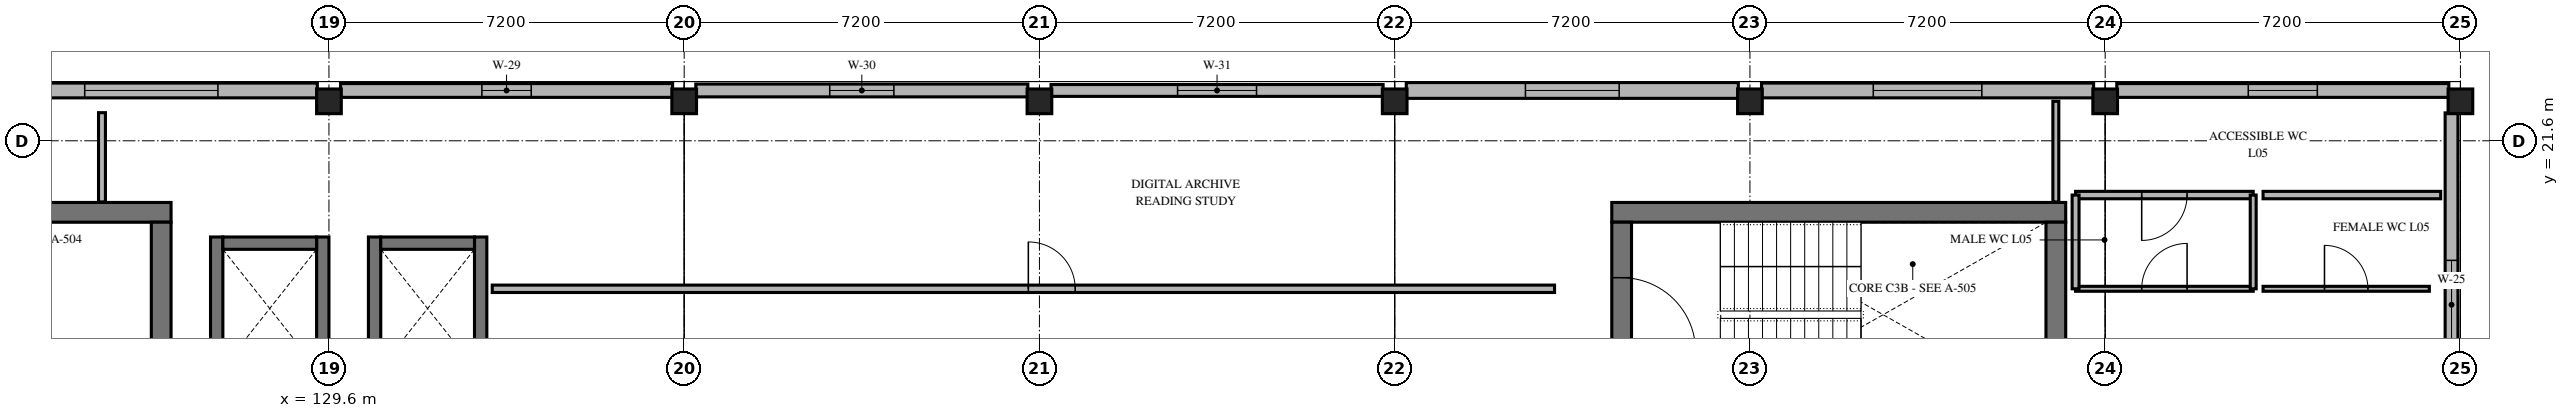
"""IFC4 building model, lengths in metres.
Left out: names, types, materials, properties, quantities, classifications, styles, units other than length and angle.
Written with IfcOpenShell. Run it as: python <this file> out.ifc"""

import sys

from ifc_helpers import new_model, si_unit, direction, frame, frame_2d, origin, origin_2d, place, context, subcontext, project, spatial, rectangle, extrude, element, fill, save


model = new_model("IFC4")
c1 = context("Model", 3, precision=1e-05, world=origin(), true_north=direction((0.0, 1.0)))
c2 = subcontext(c1, "Body", "Model", "MODEL_VIEW")
j1 = project(units=[si_unit("LENGTHUNIT", "METRE"), si_unit("PLANEANGLEUNIT", "RADIAN")], contexts=[c1])
p1 = place(None, origin())
s1 = spatial("IfcSite", under=j1, at=p1, CompositionType="ELEMENT")
p2 = place(p1, origin())
s2 = spatial("IfcBuilding", under=s1, at=p2, CompositionType="ELEMENT")
p3 = place(p2, frame((0.0, 0.0, 20.7)))
s3 = spatial("IfcBuildingStorey", under=s2, at=p3, CompositionType="ELEMENT", Elevation=20.7)
for number, where, z_axis, x_axis in (
    (1, (129.6, 22.4, 0.0), (0.0, 0.0, 1.0), (1.0, 0.0, 0.0)),
    (2, (136.8, 22.4, 0.0), (0.0, 0.0, 1.0), (1.0, 0.0, 0.0)),
    (3, (144.0, 22.4, 0.0), (0.0, 0.0, 1.0), (1.0, 0.0, 0.0)),
    (4, (151.2, 22.4, 0.0), (0.0, 0.0, 1.0), (1.0, 0.0, 0.0)),
    (5, (158.4, 22.4, 0.0), (0.0, 0.0, 1.0), (1.0, 0.0, 0.0)),
    (6, (165.6, 22.4, 0.0), (0.0, 0.0, 1.0), (1.0, 0.0, 0.0)),
    (7, (172.8, 22.4, 0.0), (0.0, 0.0, 1.0), (1.0, 0.0, 0.0)),
):
    element("IfcColumn", number, at=place(p3, frame(where, z_axis=z_axis, x_axis=x_axis)), inside=s3, PredefinedType="COLUMN", context=c2, shape_type="SweptSolid", body=[
        extrude(rectangle(XDim=0.5, YDim=0.5, at=origin_2d()), origin(), (0.0, 0.0, 1.0), 3.9),
    ])
p4 = place(p3, frame((172.62, 22.165, 0.0), z_axis=(0.0, 0.0, 1.0), x_axis=(0.0, -1.0, 0.0)))
e8 = element("IfcWall", 8, at=p4, inside=s3, PredefinedType="SOLIDWALL", context=c2, shape_type="SweptSolid", body=[
    extrude(rectangle(XDim=7.777, YDim=0.26, at=frame_2d((3.889, 0.0))), origin(), (0.0, 0.0, 1.0), 2.9),
])
p5 = place(p4, frame((2.989, 0.0, 0.9)))
e9 = element("IfcOpeningElement", 9, at=p5, cuts=e8, PredefinedType="OPENING", context=c2, shape_type="SweptSolid", body=[
    extrude(rectangle(XDim=1.8, YDim=0.75, at=frame_2d((0.9, 0.375))), frame((0.0, 0.14, 0.0), z_axis=(0.0, -1.0, 0.0), x_axis=(1.0, 0.0, 0.0)), (0.0, 0.0, 1.0), 0.28),
])
p6 = place(p3, frame((122.635, 22.62, 0.0), z_axis=(0.0, 0.0, 1.0), x_axis=(1.0, 0.0, 0.0)))
e10 = element("IfcWall", 10, at=p6, inside=s3, PredefinedType="SOLIDWALL", context=c2, shape_type="SweptSolid", body=[
    extrude(rectangle(XDim=6.73, YDim=0.3, at=frame_2d((3.365, 0.0))), origin(), (0.0, 0.0, 1.0), 3.01),
])
p7 = place(p6, frame((2.015, 0.0, 0.9)))
e11 = element("IfcOpeningElement", 11, at=p7, cuts=e10, PredefinedType="OPENING", context=c2, shape_type="SweptSolid", body=[
    extrude(rectangle(XDim=2.7, YDim=0.75, at=frame_2d((1.35, 0.375))), frame((0.0, 0.16, 0.0), z_axis=(0.0, -1.0, 0.0), x_axis=(1.0, 0.0, 0.0)), (0.0, 0.0, 1.0), 0.32),
])
p8 = place(p3, frame((129.835, 22.62, 0.0), z_axis=(0.0, 0.0, 1.0), x_axis=(1.0, 0.0, 0.0)))
e12 = element("IfcWall", 12, at=p8, inside=s3, PredefinedType="SOLIDWALL", context=c2, shape_type="SweptSolid", body=[
    extrude(rectangle(XDim=6.73, YDim=0.28, at=frame_2d((3.365, 0.0))), origin(), (0.0, 0.0, 1.0), 3.06),
])
p9 = place(p8, frame((2.865, 0.0, 0.75)))
e13 = element("IfcOpeningElement", 13, at=p9, cuts=e12, PredefinedType="OPENING", context=c2, shape_type="SweptSolid", body=[
    extrude(rectangle(XDim=1.0, YDim=1.45, at=frame_2d((0.5, 0.725))), frame((0.0, 0.15, 0.0), z_axis=(0.0, -1.0, 0.0), x_axis=(1.0, 0.0, 0.0)), (0.0, 0.0, 1.0), 0.3),
])
p10 = place(p3, frame((137.035, 22.62, 0.0), z_axis=(0.0, 0.0, 1.0), x_axis=(1.0, 0.0, 0.0)))
e14 = element("IfcWall", 14, at=p10, inside=s3, PredefinedType="SOLIDWALL", context=c2, shape_type="SweptSolid", body=[
    extrude(rectangle(XDim=6.73, YDim=0.26, at=frame_2d((3.365, 0.0))), origin(), (0.0, 0.0, 1.0), 2.86),
])
p11 = place(p10, frame((2.715, 0.0, 0.75)))
e15 = element("IfcOpeningElement", 15, at=p11, cuts=e14, PredefinedType="OPENING", context=c2, shape_type="SweptSolid", body=[
    extrude(rectangle(XDim=1.3, YDim=1.45, at=frame_2d((0.65, 0.725))), frame((0.0, 0.14, 0.0), z_axis=(0.0, -1.0, 0.0), x_axis=(1.0, 0.0, 0.0)), (0.0, 0.0, 1.0), 0.28),
])
p12 = place(p3, frame((144.235, 22.62, 0.0), z_axis=(0.0, 0.0, 1.0), x_axis=(1.0, 0.0, 0.0)))
e16 = element("IfcWall", 16, at=p12, inside=s3, PredefinedType="SOLIDWALL", context=c2, shape_type="SweptSolid", body=[
    extrude(rectangle(XDim=6.73, YDim=0.24, at=frame_2d((3.365, 0.0))), origin(), (0.0, 0.0, 1.0), 2.91),
])
p13 = place(p12, frame((2.565, 0.0, 0.75)))
e17 = element("IfcOpeningElement", 17, at=p13, cuts=e16, PredefinedType="OPENING", context=c2, shape_type="SweptSolid", body=[
    extrude(rectangle(XDim=1.6, YDim=1.45, at=frame_2d((0.8, 0.725))), frame((0.0, 0.13, 0.0), z_axis=(0.0, -1.0, 0.0), x_axis=(1.0, 0.0, 0.0)), (0.0, 0.0, 1.0), 0.26),
])
p14 = place(p3, frame((151.435, 22.62, 0.0), z_axis=(0.0, 0.0, 1.0), x_axis=(1.0, 0.0, 0.0)))
e18 = element("IfcWall", 18, at=p14, inside=s3, PredefinedType="SOLIDWALL", context=c2, shape_type="SweptSolid", body=[
    extrude(rectangle(XDim=6.73, YDim=0.32, at=frame_2d((3.365, 0.0))), origin(), (0.0, 0.0, 1.0), 2.96),
])
p15 = place(p14, frame((2.415, 0.0, 0.75)))
e19 = element("IfcOpeningElement", 19, at=p15, cuts=e18, PredefinedType="OPENING", context=c2, shape_type="SweptSolid", body=[
    extrude(rectangle(XDim=1.9, YDim=1.45, at=frame_2d((0.95, 0.725))), frame((0.0, 0.17, 0.0), z_axis=(0.0, -1.0, 0.0), x_axis=(1.0, 0.0, 0.0)), (0.0, 0.0, 1.0), 0.34),
])
p16 = place(p3, frame((158.635, 22.62, 0.0), z_axis=(0.0, 0.0, 1.0), x_axis=(1.0, 0.0, 0.0)))
e20 = element("IfcWall", 20, at=p16, inside=s3, PredefinedType="SOLIDWALL", context=c2, shape_type="SweptSolid", body=[
    extrude(rectangle(XDim=6.73, YDim=0.3, at=frame_2d((3.365, 0.0))), origin(), (0.0, 0.0, 1.0), 3.01),
])
p17 = place(p16, frame((2.265, 0.0, 0.75)))
e21 = element("IfcOpeningElement", 21, at=p17, cuts=e20, PredefinedType="OPENING", context=c2, shape_type="SweptSolid", body=[
    extrude(rectangle(XDim=2.2, YDim=1.45, at=frame_2d((1.1, 0.725))), frame((0.0, 0.16, 0.0), z_axis=(0.0, -1.0, 0.0), x_axis=(1.0, 0.0, 0.0)), (0.0, 0.0, 1.0), 0.32),
])
p18 = place(p3, frame((165.835, 22.62, 0.0), z_axis=(0.0, 0.0, 1.0), x_axis=(1.0, 0.0, 0.0)))
e22 = element("IfcWall", 22, at=p18, inside=s3, PredefinedType="SOLIDWALL", context=c2, shape_type="SweptSolid", body=[
    extrude(rectangle(XDim=6.73, YDim=0.28, at=frame_2d((3.365, 0.0))), origin(), (0.0, 0.0, 1.0), 3.06),
])
p19 = place(p18, frame((2.665, 0.0, 0.9)))
e23 = element("IfcOpeningElement", 23, at=p19, cuts=e22, PredefinedType="OPENING", context=c2, shape_type="SweptSolid", body=[
    extrude(rectangle(XDim=1.4, YDim=0.85, at=frame_2d((0.7, 0.425))), frame((0.0, 0.15, 0.0), z_axis=(0.0, -1.0, 0.0), x_axis=(1.0, 0.0, 0.0)), (0.0, 0.0, 1.0), 0.3),
])
p20 = place(p3, frame((126.4, 20.15, 0.0), z_axis=(0.0, 0.0, 1.0), x_axis=(-1.0, 0.0, 0.0)))
e24 = element("IfcWall", 24, at=p20, inside=s3, PredefinedType="SHEAR", context=c2, shape_type="SweptSolid", body=[
    extrude(rectangle(XDim=9.2, YDim=0.4, at=frame_2d((4.6, 0.0))), origin(), (0.0, 0.0, 1.0), 3.9),
])
p21 = place(p3, frame((126.2, 16.2, 0.0), z_axis=(0.0, 0.0, 1.0), x_axis=(0.0, 1.0, 0.0)))
e25 = element("IfcWall", 25, at=p21, inside=s3, PredefinedType="SHEAR", context=c2, shape_type="SweptSolid", body=[
    extrude(rectangle(XDim=3.75, YDim=0.4, at=frame_2d((1.875, 0.0))), origin(), (0.0, 0.0, 1.0), 3.9),
])
p22 = place(p3, frame((164.8, 20.15, 0.0), z_axis=(0.0, 0.0, 1.0), x_axis=(-1.0, 0.0, 0.0)))
e26 = element("IfcWall", 26, at=p22, inside=s3, PredefinedType="SHEAR", context=c2, shape_type="SweptSolid", body=[
    extrude(rectangle(XDim=9.2, YDim=0.4, at=frame_2d((4.6, 0.0))), origin(), (0.0, 0.0, 1.0), 3.9),
])
p23 = place(p3, frame((164.6, 16.2, 0.0), z_axis=(0.0, 0.0, 1.0), x_axis=(0.0, 1.0, 0.0)))
e27 = element("IfcWall", 27, at=p23, inside=s3, PredefinedType="SHEAR", context=c2, shape_type="SweptSolid", body=[
    extrude(rectangle(XDim=3.75, YDim=0.4, at=frame_2d((1.875, 0.0))), origin(), (0.0, 0.0, 1.0), 3.9),
])
p24 = place(p3, frame((155.8, 19.95, 0.0), z_axis=(0.0, 0.0, 1.0), x_axis=(0.0, -1.0, 0.0)))
e28 = element("IfcWall", 28, at=p24, inside=s3, PredefinedType="SHEAR", context=c2, shape_type="SweptSolid", body=[
    extrude(rectangle(XDim=3.75, YDim=0.4, at=frame_2d((1.875, 0.0))), origin(), (0.0, 0.0, 1.0), 3.9),
])
p25 = place(p24, frame((1.125, 0.0, 0.0)))
e29 = element("IfcOpeningElement", 29, at=p25, cuts=e28, PredefinedType="OPENING", context=c2, shape_type="SweptSolid", body=[
    extrude(rectangle(XDim=1.5, YDim=2.2, at=frame_2d((0.75, 1.1))), frame((0.0, 0.21, 0.0), z_axis=(0.0, -1.0, 0.0), x_axis=(1.0, 0.0, 0.0)), (0.0, 0.0, 1.0), 0.42),
])
for number, where, z_axis, x_axis in (
    (30, (127.325, 16.75, 0.0), (0.0, 0.0, 1.0), (0.0, 1.0, 0.0)),
    (31, (129.475, 19.65, 0.0), (0.0, 0.0, 1.0), (0.0, -1.0, 0.0)),
):
    element("IfcWall", number, at=place(p3, frame(where, z_axis=z_axis, x_axis=x_axis)), inside=s3, PredefinedType="SOLIDWALL", context=c2, shape_type="SweptSolid", body=[
        extrude(rectangle(XDim=2.9, YDim=0.25, at=frame_2d((1.45, 0.0))), origin(), (0.0, 0.0, 1.0), 3.66),
    ])
p26 = place(p3, frame((129.35, 19.525, 0.0), z_axis=(0.0, 0.0, 1.0), x_axis=(-1.0, 0.0, 0.0)))
e32 = element("IfcWall", 32, at=p26, inside=s3, PredefinedType="SOLIDWALL", context=c2, shape_type="SweptSolid", body=[
    extrude(rectangle(XDim=1.9, YDim=0.25, at=frame_2d((0.95, 0.0))), origin(), (0.0, 0.0, 1.0), 3.66),
])
for number, where, z_axis, x_axis in (
    (33, (130.525, 16.75, 0.0), (0.0, 0.0, 1.0), (0.0, 1.0, 0.0)),
    (34, (132.675, 19.65, 0.0), (0.0, 0.0, 1.0), (0.0, -1.0, 0.0)),
):
    element("IfcWall", number, at=place(p3, frame(where, z_axis=z_axis, x_axis=x_axis)), inside=s3, PredefinedType="SOLIDWALL", context=c2, shape_type="SweptSolid", body=[
        extrude(rectangle(XDim=2.9, YDim=0.25, at=frame_2d((1.45, 0.0))), origin(), (0.0, 0.0, 1.0), 3.66),
    ])
p27 = place(p3, frame((132.55, 19.525, 0.0), z_axis=(0.0, 0.0, 1.0), x_axis=(-1.0, 0.0, 0.0)))
e35 = element("IfcWall", 35, at=p27, inside=s3, PredefinedType="SOLIDWALL", context=c2, shape_type="SweptSolid", body=[
    extrude(rectangle(XDim=1.9, YDim=0.25, at=frame_2d((0.95, 0.0))), origin(), (0.0, 0.0, 1.0), 3.66),
])
p28 = place(p3, frame((132.91, 18.6, 0.0), z_axis=(0.0, 0.0, 1.0), x_axis=(1.0, 0.0, 0.0)))
e36 = element("IfcWall", 36, at=p28, inside=s3, PredefinedType="PARTITIONING", context=c2, shape_type="SweptSolid", body=[
    extrude(rectangle(XDim=21.53, YDim=0.15, at=frame_2d((10.765, 0.0))), origin(), (0.0, 0.0, 1.0), 2.86),
])
p29 = place(p28, frame((10.865, 0.0, 0.0)))
e37 = element("IfcOpeningElement", 37, at=p29, cuts=e36, PredefinedType="OPENING", context=c2, shape_type="SweptSolid", body=[
    extrude(rectangle(XDim=0.95, YDim=2.15, at=frame_2d((0.475, 1.075))), frame((0.0, 0.085, 0.0), z_axis=(0.0, -1.0, 0.0), x_axis=(1.0, 0.0, 0.0)), (0.0, 0.0, 1.0), 0.17),
])
p30 = place(p3, frame((125.0, 22.17, 0.0), z_axis=(0.0, 0.0, 1.0), x_axis=(0.0, -1.0, 0.0)))
e38 = element("IfcWall", 38, at=p30, inside=s3, PredefinedType="PARTITIONING", context=c2, shape_type="SweptSolid", body=[
    extrude(rectangle(XDim=1.81, YDim=0.14, at=frame_2d((0.905, 0.0))), origin(), (0.0, 0.0, 1.0), 3.66),
])
p31 = place(p3, frame((164.6, 20.36, 0.0), z_axis=(0.0, 0.0, 1.0), x_axis=(0.0, 1.0, 0.0)))
e39 = element("IfcWall", 39, at=p31, inside=s3, PredefinedType="PARTITIONING", context=c2, shape_type="SweptSolid", body=[
    extrude(rectangle(XDim=2.04, YDim=0.12, at=frame_2d((1.02, 0.0))), origin(), (0.0, 0.0, 1.0), 3.01),
])
p32 = place(p3, frame((165.0, 18.6, 0.0), z_axis=(0.0, 0.0, 1.0), x_axis=(1.0, 0.0, 0.0)))
e40 = element("IfcWall", 40, at=p32, inside=s3, PredefinedType="PARTITIONING", context=c2, shape_type="SweptSolid", body=[
    extrude(rectangle(XDim=3.6, YDim=0.1, at=frame_2d((1.8, 0.0))), origin(), (0.0, 0.0, 1.0), 2.91),
])
p33 = place(p32, frame((1.34, 0.0, 0.0)))
e41 = element("IfcOpeningElement", 41, at=p33, cuts=e40, PredefinedType="OPENING", context=c2, shape_type="SweptSolid", body=[
    extrude(rectangle(XDim=0.92, YDim=2.1, at=frame_2d((0.46, 1.05))), frame((0.0, 0.06, 0.0), z_axis=(0.0, -1.0, 0.0), x_axis=(1.0, 0.0, 0.0)), (0.0, 0.0, 1.0), 0.12),
])
p34 = place(p3, frame((168.6, 20.5, 0.0), z_axis=(0.0, 0.0, 1.0), x_axis=(-1.0, 0.0, 0.0)))
e42 = element("IfcWall", 42, at=p34, inside=s3, PredefinedType="PARTITIONING", context=c2, shape_type="SweptSolid", body=[
    extrude(rectangle(XDim=3.6, YDim=0.15, at=frame_2d((1.8, 0.0))), origin(), (0.0, 0.0, 1.0), 2.91),
])
p35 = place(p34, frame((1.34, 0.0, 0.0)))
e43 = element("IfcOpeningElement", 43, at=p35, cuts=e42, PredefinedType="OPENING", context=c2, shape_type="SweptSolid", body=[
    extrude(rectangle(XDim=0.92, YDim=2.1, at=frame_2d((0.46, 1.05))), frame((0.0, 0.085, 0.0), z_axis=(0.0, -1.0, 0.0), x_axis=(1.0, 0.0, 0.0)), (0.0, 0.0, 1.0), 0.17),
])
p36 = place(p3, frame((165.0, 20.5, 0.0), z_axis=(0.0, 0.0, 1.0), x_axis=(0.0, -1.0, 0.0)))
e44 = element("IfcWall", 44, at=p36, inside=s3, PredefinedType="PARTITIONING", context=c2, shape_type="SweptSolid", body=[
    extrude(rectangle(XDim=1.9, YDim=0.14, at=frame_2d((0.95, 0.0))), origin(), (0.0, 0.0, 1.0), 3.66),
])
p37 = place(p3, frame((168.6, 18.6, 0.0), z_axis=(0.0, 0.0, 1.0), x_axis=(0.0, 1.0, 0.0)))
e45 = element("IfcWall", 45, at=p37, inside=s3, PredefinedType="PARTITIONING", context=c2, shape_type="SweptSolid", body=[
    extrude(rectangle(XDim=1.9, YDim=0.12, at=frame_2d((0.95, 0.0))), origin(), (0.0, 0.0, 1.0), 2.9),
])
p38 = place(p3, frame((168.8, 18.6, 0.0), z_axis=(0.0, 0.0, 1.0), x_axis=(1.0, 0.0, 0.0)))
e46 = element("IfcWall", 46, at=p38, inside=s3, PredefinedType="PARTITIONING", context=c2, shape_type="SweptSolid", body=[
    extrude(rectangle(XDim=3.37, YDim=0.1, at=frame_2d((1.685, 0.0))), origin(), (0.0, 0.0, 1.0), 3.66),
])
p39 = place(p38, frame((1.245, 0.0, 0.0)))
e47 = element("IfcOpeningElement", 47, at=p39, cuts=e46, PredefinedType="OPENING", context=c2, shape_type="SweptSolid", body=[
    extrude(rectangle(XDim=0.88, YDim=2.1, at=frame_2d((0.44, 1.05))), frame((0.0, 0.06, 0.0), z_axis=(0.0, -1.0, 0.0), x_axis=(1.0, 0.0, 0.0)), (0.0, 0.0, 1.0), 0.12),
])
p40 = place(p3, frame((172.4, 20.5, 0.0), z_axis=(0.0, 0.0, 1.0), x_axis=(-1.0, 0.0, 0.0)))
e48 = element("IfcWall", 48, at=p40, inside=s3, PredefinedType="PARTITIONING", context=c2, shape_type="SweptSolid", body=[
    extrude(rectangle(XDim=3.6, YDim=0.15, at=frame_2d((1.8, 0.0))), origin(), (0.0, 0.0, 1.0), 3.66),
])
p41 = place(p5, origin())
e49 = element("IfcWindow", 49, at=p41, inside=s3, PartitioningType="SINGLE_PANEL", PredefinedType="WINDOW", context=c2, shape_type="SweptSolid", body=[
    extrude(rectangle(XDim=1.8, YDim=0.75, at=frame_2d((0.9, 0.375))), frame((0.0, 0.03, 0.0), z_axis=(0.0, -1.0, 0.0), x_axis=(1.0, 0.0, 0.0)), (0.0, 0.0, 1.0), 0.06),
])
fill(e9, e49)
p42 = place(p7, origin())
e50 = element("IfcWindow", 50, at=p42, inside=s3, PartitioningType="SINGLE_PANEL", PredefinedType="WINDOW", context=c2, shape_type="SweptSolid", body=[
    extrude(rectangle(XDim=2.7, YDim=0.75, at=frame_2d((1.35, 0.375))), frame((0.0, 0.03, 0.0), z_axis=(0.0, -1.0, 0.0), x_axis=(1.0, 0.0, 0.0)), (0.0, 0.0, 1.0), 0.06),
])
fill(e11, e50)
p43 = place(p9, origin())
e51 = element("IfcWindow", 51, at=p43, inside=s3, PartitioningType="SINGLE_PANEL", PredefinedType="WINDOW", context=c2, shape_type="SweptSolid", body=[
    extrude(rectangle(XDim=1.0, YDim=1.45, at=frame_2d((0.5, 0.725))), frame((0.0, 0.03, 0.0), z_axis=(0.0, -1.0, 0.0), x_axis=(1.0, 0.0, 0.0)), (0.0, 0.0, 1.0), 0.06),
])
fill(e13, e51)
p44 = place(p11, origin())
e52 = element("IfcWindow", 52, at=p44, inside=s3, PartitioningType="SINGLE_PANEL", PredefinedType="WINDOW", context=c2, shape_type="SweptSolid", body=[
    extrude(rectangle(XDim=1.3, YDim=1.45, at=frame_2d((0.65, 0.725))), frame((0.0, 0.03, 0.0), z_axis=(0.0, -1.0, 0.0), x_axis=(1.0, 0.0, 0.0)), (0.0, 0.0, 1.0), 0.06),
])
fill(e15, e52)
p45 = place(p13, origin())
e53 = element("IfcWindow", 53, at=p45, inside=s3, PartitioningType="SINGLE_PANEL", PredefinedType="WINDOW", context=c2, shape_type="SweptSolid", body=[
    extrude(rectangle(XDim=1.6, YDim=1.45, at=frame_2d((0.8, 0.725))), frame((0.0, 0.03, 0.0), z_axis=(0.0, -1.0, 0.0), x_axis=(1.0, 0.0, 0.0)), (0.0, 0.0, 1.0), 0.06),
])
fill(e17, e53)
p46 = place(p15, origin())
e54 = element("IfcWindow", 54, at=p46, inside=s3, PartitioningType="SINGLE_PANEL", PredefinedType="WINDOW", context=c2, shape_type="SweptSolid", body=[
    extrude(rectangle(XDim=1.9, YDim=1.45, at=frame_2d((0.95, 0.725))), frame((0.0, 0.03, 0.0), z_axis=(0.0, -1.0, 0.0), x_axis=(1.0, 0.0, 0.0)), (0.0, 0.0, 1.0), 0.06),
])
fill(e19, e54)
p47 = place(p17, origin())
e55 = element("IfcWindow", 55, at=p47, inside=s3, PartitioningType="SINGLE_PANEL", PredefinedType="WINDOW", context=c2, shape_type="SweptSolid", body=[
    extrude(rectangle(XDim=2.2, YDim=1.45, at=frame_2d((1.1, 0.725))), frame((0.0, 0.03, 0.0), z_axis=(0.0, -1.0, 0.0), x_axis=(1.0, 0.0, 0.0)), (0.0, 0.0, 1.0), 0.06),
])
fill(e21, e55)
p48 = place(p19, origin())
e56 = element("IfcWindow", 56, at=p48, inside=s3, PartitioningType="SINGLE_PANEL", PredefinedType="WINDOW", context=c2, shape_type="SweptSolid", body=[
    extrude(rectangle(XDim=1.4, YDim=0.85, at=frame_2d((0.7, 0.425))), frame((0.0, 0.03, 0.0), z_axis=(0.0, -1.0, 0.0), x_axis=(1.0, 0.0, 0.0)), (0.0, 0.0, 1.0), 0.06),
])
fill(e23, e56)
p49 = place(p25, origin())
e57 = element("IfcDoor", 57, at=p49, inside=s3, OperationType="SINGLE_SWING_RIGHT", PredefinedType="DOOR", context=c2, shape_type="SweptSolid", body=[
    extrude(rectangle(XDim=1.5, YDim=2.2, at=frame_2d((0.75, 1.1))), frame((0.0, 0.025, 0.0), z_axis=(0.0, -1.0, 0.0), x_axis=(1.0, 0.0, 0.0)), (0.0, 0.0, 1.0), 0.05),
])
fill(e29, e57)
p50 = place(p29, origin())
e58 = element("IfcDoor", 58, at=p50, inside=s3, OperationType="SINGLE_SWING_LEFT", PredefinedType="DOOR", context=c2, shape_type="SweptSolid", body=[
    extrude(rectangle(XDim=0.95, YDim=2.15, at=frame_2d((0.475, 1.075))), frame((0.0, 0.025, 0.0), z_axis=(0.0, -1.0, 0.0), x_axis=(1.0, 0.0, 0.0)), (0.0, 0.0, 1.0), 0.05),
])
fill(e37, e58)
p51 = place(p33, origin())
e59 = element("IfcDoor", 59, at=p51, inside=s3, OperationType="SINGLE_SWING_RIGHT", PredefinedType="DOOR", context=c2, shape_type="SweptSolid", body=[
    extrude(rectangle(XDim=0.92, YDim=2.1, at=frame_2d((0.46, 1.05))), frame((0.0, 0.025, 0.0), z_axis=(0.0, -1.0, 0.0), x_axis=(1.0, 0.0, 0.0)), (0.0, 0.0, 1.0), 0.05),
])
fill(e41, e59)
p52 = place(p39, origin())
e60 = element("IfcDoor", 60, at=p52, inside=s3, OperationType="SINGLE_SWING_LEFT", PredefinedType="DOOR", context=c2, shape_type="SweptSolid", body=[
    extrude(rectangle(XDim=0.88, YDim=2.1, at=frame_2d((0.44, 1.05))), frame((0.0, 0.025, 0.0), z_axis=(0.0, -1.0, 0.0), x_axis=(1.0, 0.0, 0.0)), (0.0, 0.0, 1.0), 0.05),
])
fill(e47, e60)
p53 = place(p35, origin())
e61 = element("IfcDoor", 61, at=p53, inside=s3, OperationType="SINGLE_SWING_RIGHT", PredefinedType="DOOR", context=c2, shape_type="SweptSolid", body=[
    extrude(rectangle(XDim=0.92, YDim=2.1, at=frame_2d((0.46, 1.05))), frame((0.0, 0.025, 0.0), z_axis=(0.0, -1.0, 0.0), x_axis=(1.0, 0.0, 0.0)), (0.0, 0.0, 1.0), 0.05),
])
fill(e43, e61)
save(model, sys.argv[1])
